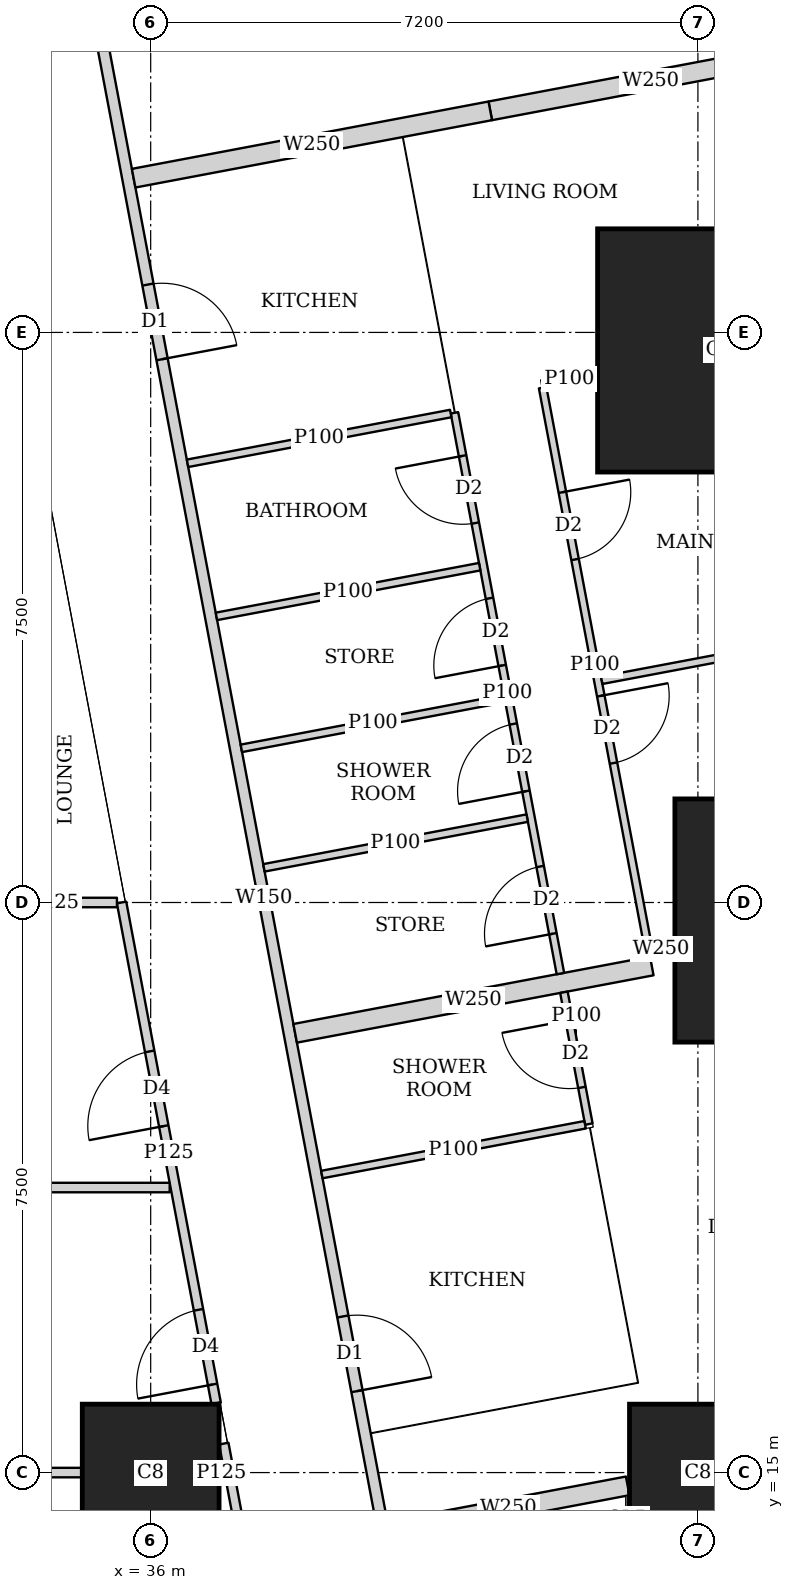
"""IFC4 building model, lengths in metres.
Left out: names, types, materials, properties, quantities, classifications, styles, units other than length and angle.
Written with IfcOpenShell. Run it as: python <this file> out.ifc"""

import sys

from ifc_helpers import new_model, si_unit, direction, frame, frame_2d, origin, origin_2d, place, context, subcontext, project, spatial, rectangle, extrude, element, fill, save


model = new_model("IFC4")
c1 = context("Model", 3, precision=1e-05, world=origin(), true_north=direction((0.0, 1.0)))
c2 = subcontext(c1, "Body", "Model", "MODEL_VIEW")
j1 = project(units=[si_unit("LENGTHUNIT", "METRE"), si_unit("PLANEANGLEUNIT", "RADIAN")], contexts=[c1])
p1 = place(None, origin())
s1 = spatial("IfcSite", under=j1, at=p1, CompositionType="ELEMENT")
p2 = place(p1, origin())
s2 = spatial("IfcBuilding", under=s1, at=p2, CompositionType="ELEMENT")
p3 = place(p2, frame((0.0, 0.0, 23.75)))
s3 = spatial("IfcBuildingStorey", under=s2, at=p3, CompositionType="ELEMENT", Elevation=23.75)
for number, where, z_axis, x_axis in (
    (1, (36.0, 15.0, 0.0), (0.0, 0.0, 1.0), (1.0, 0.0, 0.0)),
    (2, (43.2, 15.0, 0.0), (0.0, 0.0, 1.0), (1.0, 0.0, 0.0)),
):
    element("IfcColumn", number, at=place(p3, frame(where, z_axis=z_axis, x_axis=x_axis)), inside=s3, PredefinedType="COLUMN", context=c2, shape_type="SweptSolid", body=[
        extrude(rectangle(XDim=1.8, YDim=1.8, at=origin_2d()), origin(), (0.0, 0.0, 1.0), 3.75),
    ])
p4 = place(p3, frame((44.697, 22.263, 0.0), z_axis=(0.0, 0.0, 1.0), x_axis=(1.0, 0.0, 0.0)))
e3 = element("IfcColumn", 3, at=p4, inside=s3, PredefinedType="COLUMN", context=c2, shape_type="SweptSolid", body=[
    extrude(rectangle(XDim=3.6, YDim=3.2, at=origin_2d()), origin(), (0.0, 0.0, 1.0), 3.75),
])
p5 = place(p3, frame((43.48, 29.763, 0.0), z_axis=(0.0, 0.0, 1.0), x_axis=(1.0, 0.0, 0.0)))
e4 = element("IfcColumn", 4, at=p5, inside=s3, PredefinedType="COLUMN", context=c2, shape_type="SweptSolid", body=[
    extrude(rectangle(XDim=3.2, YDim=3.2, at=origin_2d()), origin(), (0.0, 0.0, 1.0), 3.75),
])
p6 = place(p3, frame((50.653, 2.703, 0.0), z_axis=(0.0, 0.0, 1.0), x_axis=(-0.185612026696, 0.982623109613, 0.0)))
e5 = element("IfcWall", 5, at=p6, inside=s3, PredefinedType="SOLIDWALL", context=c2, shape_type="SweptSolid", body=[
    extrude(rectangle(XDim=41.393, YDim=0.2, at=frame_2d((20.697, 0.0))), origin(), (0.0, 0.0, 1.0), 3.5),
])
p7 = place(p6, frame((1.633, 0.0, 0.9)))
e6 = element("IfcOpeningElement", 6, at=p7, cuts=e5, PredefinedType="OPENING", context=c2, shape_type="SweptSolid", body=[
    extrude(rectangle(XDim=1.8, YDim=1.5, at=frame_2d((0.9, 0.75))), frame((0.0, 0.11, 0.0), z_axis=(0.0, -1.0, 0.0), x_axis=(1.0, 0.0, 0.0)), (0.0, 0.0, 1.0), 0.22),
])
p8 = place(p6, frame((6.032, 0.0, 0.9)))
e7 = element("IfcOpeningElement", 7, at=p8, cuts=e5, PredefinedType="OPENING", context=c2, shape_type="SweptSolid", body=[
    extrude(rectangle(XDim=1.8, YDim=1.5, at=frame_2d((0.9, 0.75))), frame((0.0, 0.11, 0.0), z_axis=(0.0, -1.0, 0.0), x_axis=(1.0, 0.0, 0.0)), (0.0, 0.0, 1.0), 0.22),
])
p9 = place(p6, frame((9.848, 0.0, 0.9)))
e8 = element("IfcOpeningElement", 8, at=p9, cuts=e5, PredefinedType="OPENING", context=c2, shape_type="SweptSolid", body=[
    extrude(rectangle(XDim=1.8, YDim=1.5, at=frame_2d((0.9, 0.75))), frame((0.0, 0.11, 0.0), z_axis=(0.0, -1.0, 0.0), x_axis=(1.0, 0.0, 0.0)), (0.0, 0.0, 1.0), 0.22),
])
p10 = place(p6, frame((17.481, 0.0, 0.9)))
e9 = element("IfcOpeningElement", 9, at=p10, cuts=e5, PredefinedType="OPENING", context=c2, shape_type="SweptSolid", body=[
    extrude(rectangle(XDim=1.8, YDim=1.5, at=frame_2d((0.9, 0.75))), frame((0.0, 0.11, 0.0), z_axis=(0.0, -1.0, 0.0), x_axis=(1.0, 0.0, 0.0)), (0.0, 0.0, 1.0), 0.22),
])
p11 = place(p6, frame((21.297, 0.0, 0.9)))
e10 = element("IfcOpeningElement", 10, at=p11, cuts=e5, PredefinedType="OPENING", context=c2, shape_type="SweptSolid", body=[
    extrude(rectangle(XDim=1.8, YDim=1.5, at=frame_2d((0.9, 0.75))), frame((0.0, 0.11, 0.0), z_axis=(0.0, -1.0, 0.0), x_axis=(1.0, 0.0, 0.0)), (0.0, 0.0, 1.0), 0.22),
])
p12 = place(p6, frame((25.113, 0.0, 0.9)))
e11 = element("IfcOpeningElement", 11, at=p12, cuts=e5, PredefinedType="OPENING", context=c2, shape_type="SweptSolid", body=[
    extrude(rectangle(XDim=1.8, YDim=1.5, at=frame_2d((0.9, 0.75))), frame((0.0, 0.11, 0.0), z_axis=(0.0, -1.0, 0.0), x_axis=(1.0, 0.0, 0.0)), (0.0, 0.0, 1.0), 0.22),
])
p13 = place(p6, frame((28.93, 0.0, 0.9)))
e12 = element("IfcOpeningElement", 12, at=p13, cuts=e5, PredefinedType="OPENING", context=c2, shape_type="SweptSolid", body=[
    extrude(rectangle(XDim=1.8, YDim=1.5, at=frame_2d((0.9, 0.75))), frame((0.0, 0.11, 0.0), z_axis=(0.0, -1.0, 0.0), x_axis=(1.0, 0.0, 0.0)), (0.0, 0.0, 1.0), 0.22),
])
p14 = place(p6, frame((32.746, 0.0, 0.9)))
e13 = element("IfcOpeningElement", 13, at=p14, cuts=e5, PredefinedType="OPENING", context=c2, shape_type="SweptSolid", body=[
    extrude(rectangle(XDim=1.8, YDim=1.5, at=frame_2d((0.9, 0.75))), frame((0.0, 0.11, 0.0), z_axis=(0.0, -1.0, 0.0), x_axis=(1.0, 0.0, 0.0)), (0.0, 0.0, 1.0), 0.22),
])
p15 = place(p6, frame((36.481, 0.0, 0.9)))
e14 = element("IfcOpeningElement", 14, at=p15, cuts=e5, PredefinedType="OPENING", context=c2, shape_type="SweptSolid", body=[
    extrude(rectangle(XDim=1.8, YDim=1.5, at=frame_2d((0.9, 0.75))), frame((0.0, 0.11, 0.0), z_axis=(0.0, -1.0, 0.0), x_axis=(1.0, 0.0, 0.0)), (0.0, 0.0, 1.0), 0.22),
])
p16 = place(p3, frame((33.755, 42.325, 0.0), z_axis=(0.0, 0.0, 1.0), x_axis=(0.185611461091, -0.982623216453, 0.0)))
e15 = element("IfcWall", 15, at=p16, inside=s3, PredefinedType="SOLIDWALL", context=c2, shape_type="SweptSolid", body=[
    extrude(rectangle(XDim=40.241, YDim=0.15, at=frame_2d((20.121, 0.0))), origin(), (0.0, 0.0, 1.0), 2.5),
])
p17 = place(p16, frame((7.325, 0.0, 0.0)))
e16 = element("IfcOpeningElement", 16, at=p17, cuts=e15, PredefinedType="OPENING", context=c2, shape_type="SweptSolid", body=[
    extrude(rectangle(XDim=1.0, YDim=2.1, at=frame_2d((0.5, 1.05))), frame((0.0, 0.085, 0.0), z_axis=(0.0, -1.0, 0.0), x_axis=(1.0, 0.0, 0.0)), (0.0, 0.0, 1.0), 0.17),
])
p18 = place(p16, frame((11.902, 0.0, 0.0)))
e17 = element("IfcOpeningElement", 17, at=p18, cuts=e15, PredefinedType="OPENING", context=c2, shape_type="SweptSolid", body=[
    extrude(rectangle(XDim=1.0, YDim=2.1, at=frame_2d((0.5, 1.05))), frame((0.0, 0.085, 0.0), z_axis=(0.0, -1.0, 0.0), x_axis=(1.0, 0.0, 0.0)), (0.0, 0.0, 1.0), 0.17),
])
p19 = place(p16, frame((25.718, 0.0, 0.0)))
e18 = element("IfcOpeningElement", 18, at=p19, cuts=e15, PredefinedType="OPENING", context=c2, shape_type="SweptSolid", body=[
    extrude(rectangle(XDim=1.0, YDim=2.1, at=frame_2d((0.5, 1.05))), frame((0.0, 0.085, 0.0), z_axis=(0.0, -1.0, 0.0), x_axis=(1.0, 0.0, 0.0)), (0.0, 0.0, 1.0), 0.17),
])
p20 = place(p16, frame((31.788, 0.0, 0.0)))
e19 = element("IfcOpeningElement", 19, at=p20, cuts=e15, PredefinedType="OPENING", context=c2, shape_type="SweptSolid", body=[
    extrude(rectangle(XDim=1.0, YDim=2.1, at=frame_2d((0.5, 1.05))), frame((0.0, 0.085, 0.0), z_axis=(0.0, -1.0, 0.0), x_axis=(1.0, 0.0, 0.0)), (0.0, 0.0, 1.0), 0.17),
])
p21 = place(p3, frame((41.157, 29.273, 0.0), z_axis=(0.0, 0.0, 1.0), x_axis=(0.18542464283, -0.982658486877, 0.0)))
e20 = element("IfcWall", 20, at=p21, inside=s3, PredefinedType="PARTITIONING", context=c2, shape_type="SweptSolid", body=[
    extrude(rectangle(XDim=7.421, YDim=0.1, at=frame_2d((3.71, 0.0))), origin(), (0.0, 0.0, 1.0), 2.5),
])
p22 = place(p21, frame((1.4, 0.0, 0.0)))
e21 = element("IfcOpeningElement", 21, at=p22, cuts=e20, PredefinedType="OPENING", context=c2, shape_type="SweptSolid", body=[
    extrude(rectangle(XDim=0.9, YDim=2.1, at=frame_2d((0.45, 1.05))), frame((0.0, 0.06, 0.0), z_axis=(0.0, -1.0, 0.0), x_axis=(1.0, 0.0, 0.0)), (0.0, 0.0, 1.0), 0.12),
])
p23 = place(p21, frame((4.126, 0.0, 0.0)))
e22 = element("IfcOpeningElement", 22, at=p23, cuts=e20, PredefinedType="OPENING", context=c2, shape_type="SweptSolid", body=[
    extrude(rectangle(XDim=0.9, YDim=2.1, at=frame_2d((0.45, 1.05))), frame((0.0, 0.06, 0.0), z_axis=(0.0, -1.0, 0.0), x_axis=(1.0, 0.0, 0.0)), (0.0, 0.0, 1.0), 0.12),
])
p24 = place(p3, frame((39.997, 28.942, 0.0), z_axis=(0.0, 0.0, 1.0), x_axis=(0.185686318797, -0.982609073341, 0.0)))
e23 = element("IfcWall", 23, at=p24, inside=s3, PredefinedType="PARTITIONING", context=c2, shape_type="SweptSolid", body=[
    extrude(rectangle(XDim=7.508, YDim=0.1, at=frame_2d((3.754, 0.0))), origin(), (0.0, 0.0, 1.0), 2.5),
])
p25 = place(p24, frame((0.576, 0.0, 0.0)))
e24 = element("IfcOpeningElement", 24, at=p25, cuts=e23, PredefinedType="OPENING", context=c2, shape_type="SweptSolid", body=[
    extrude(rectangle(XDim=0.9, YDim=2.1, at=frame_2d((0.45, 1.05))), frame((0.0, 0.06, 0.0), z_axis=(0.0, -1.0, 0.0), x_axis=(1.0, 0.0, 0.0)), (0.0, 0.0, 1.0), 0.12),
])
p26 = place(p24, frame((4.166, 0.0, 0.0)))
e25 = element("IfcOpeningElement", 25, at=p26, cuts=e23, PredefinedType="OPENING", context=c2, shape_type="SweptSolid", body=[
    extrude(rectangle(XDim=0.9, YDim=2.1, at=frame_2d((0.45, 1.05))), frame((0.0, 0.06, 0.0), z_axis=(0.0, -1.0, 0.0), x_axis=(1.0, 0.0, 0.0)), (0.0, 0.0, 1.0), 0.12),
])
p27 = place(p24, frame((2.483, 0.0, 0.0)))
e26 = element("IfcOpeningElement", 26, at=p27, cuts=e23, PredefinedType="OPENING", context=c2, shape_type="SweptSolid", body=[
    extrude(rectangle(XDim=0.9, YDim=2.1, at=frame_2d((0.45, 1.05))), frame((0.0, 0.06, 0.0), z_axis=(0.0, -1.0, 0.0), x_axis=(1.0, 0.0, 0.0)), (0.0, 0.0, 1.0), 0.12),
])
p28 = place(p24, frame((6.074, 0.0, 0.0)))
e27 = element("IfcOpeningElement", 27, at=p28, cuts=e23, PredefinedType="OPENING", context=c2, shape_type="SweptSolid", body=[
    extrude(rectangle(XDim=0.9, YDim=2.1, at=frame_2d((0.45, 1.05))), frame((0.0, 0.06, 0.0), z_axis=(0.0, -1.0, 0.0), x_axis=(1.0, 0.0, 0.0)), (0.0, 0.0, 1.0), 0.12),
])
p29 = place(p3, frame((41.87, 29.459, 0.0), z_axis=(0.0, 0.0, 1.0), x_axis=(-0.982532562822, -0.186090738603, 0.0)))
e28 = element("IfcWall", 28, at=p29, inside=s3, PredefinedType="PARTITIONING", context=c2, shape_type="SweptSolid", body=[
    extrude(rectangle(XDim=0.736, YDim=0.1, at=frame_2d((0.368, 0.0))), origin(), (0.0, 0.0, 1.0), 2.5),
])
p30 = place(p3, frame((46.11, 26.213, 0.0), z_axis=(0.0, 0.0, 1.0), x_axis=(-0.982623519589, -0.185609856287, 0.0)))
e29 = element("IfcWall", 29, at=p30, inside=s3, PredefinedType="PARTITIONING", context=c2, shape_type="SweptSolid", body=[
    extrude(rectangle(XDim=4.25, YDim=0.1, at=frame_2d((2.125, 0.0))), origin(), (0.0, 0.0, 1.0), 2.05),
])
for number, where, z_axis, x_axis in (
    (30, (39.948, 28.933, 0.0), (0.0, 0.0, 1.0), (-0.983, -0.186, 0.0)),
    (31, (40.656, 25.183, 0.0), (0.0, 0.0, 1.0), (-0.983, -0.186, 0.0)),
):
    element("IfcWall", number, at=place(p3, frame(where, z_axis=z_axis, x_axis=x_axis)), inside=s3, PredefinedType="PARTITIONING", context=c2, shape_type="SweptSolid", body=[
        extrude(rectangle(XDim=3.524, YDim=0.1, at=frame_2d((1.762, 0.0))), origin(), (0.0, 0.0, 1.0), 3.5),
    ])
p31 = place(p3, frame((40.329, 26.918, 0.0), z_axis=(0.0, 0.0, 1.0), x_axis=(-0.982638553676, -0.185530247748, 0.0)))
e32 = element("IfcWall", 32, at=p31, inside=s3, PredefinedType="PARTITIONING", context=c2, shape_type="SweptSolid", body=[
    extrude(rectangle(XDim=3.525, YDim=0.1, at=frame_2d((1.763, 0.0))), origin(), (0.0, 0.0, 1.0), 3.5),
])
p32 = place(p3, frame((40.954, 23.61, 0.0), z_axis=(0.0, 0.0, 1.0), x_axis=(-0.982638553676, -0.185530247748, 0.0)))
e33 = element("IfcWall", 33, at=p32, inside=s3, PredefinedType="PARTITIONING", context=c2, shape_type="SweptSolid", body=[
    extrude(rectangle(XDim=3.525, YDim=0.1, at=frame_2d((1.763, 0.0))), origin(), (0.0, 0.0, 1.0), 2.5),
])
p33 = place(p3, frame((44.693, 33.713, 0.0), z_axis=(0.0, 0.0, 1.0), x_axis=(-0.982633535512, -0.185556823879, 0.0)))
e34 = element("IfcWall", 34, at=p33, inside=s3, PredefinedType="SOLIDWALL", context=c2, shape_type="SweptSolid", body=[
    extrude(rectangle(XDim=4.3, YDim=0.25, at=frame_2d((2.15, 0.0))), origin(), (0.0, 0.0, 1.0), 2.05),
])
p34 = place(p3, frame((40.468, 32.915, 0.0), z_axis=(0.0, 0.0, 1.0), x_axis=(-0.982635807605, -0.185544791394, 0.0)))
e35 = element("IfcWall", 35, at=p34, inside=s3, PredefinedType="SOLIDWALL", context=c2, shape_type="SweptSolid", body=[
    extrude(rectangle(XDim=4.775, YDim=0.25, at=frame_2d((2.388, 0.0))), origin(), (0.0, 0.0, 1.0), 3.5),
])
p35 = place(p3, frame((41.437, 21.319, 0.0), z_axis=(0.0, 0.0, 1.0), x_axis=(0.185783379659, -0.98259072652, 0.0)))
e36 = element("IfcWall", 36, at=p35, inside=s3, PredefinedType="PARTITIONING", context=c2, shape_type="SweptSolid", body=[
    extrude(rectangle(XDim=1.765, YDim=0.1, at=frame_2d((0.882, 0.0))), origin(), (0.0, 0.0, 1.0), 3.5),
])
p36 = place(p35, frame((0.374, 0.0, 0.0)))
e37 = element("IfcOpeningElement", 37, at=p36, cuts=e36, PredefinedType="OPENING", context=c2, shape_type="SweptSolid", body=[
    extrude(rectangle(XDim=0.9, YDim=2.1, at=frame_2d((0.45, 1.05))), frame((0.0, 0.06, 0.0), z_axis=(0.0, -1.0, 0.0), x_axis=(1.0, 0.0, 0.0)), (0.0, 0.0, 1.0), 0.12),
])
p37 = place(p3, frame((41.716, 19.576, 0.0), z_axis=(0.0, 0.0, 1.0), x_axis=(-0.982588017646, -0.185797706064, 0.0)))
e38 = element("IfcWall", 38, at=p37, inside=s3, PredefinedType="PARTITIONING", context=c2, shape_type="SweptSolid", body=[
    extrude(rectangle(XDim=3.525, YDim=0.1, at=frame_2d((1.763, 0.0))), origin(), (0.0, 0.0, 1.0), 3.5),
])
p38 = place(p3, frame((42.873, 21.918, 0.0), z_axis=(0.0, 0.0, 1.0), x_axis=(-0.982431406936, -0.186624035603, 0.0)))
e39 = element("IfcWall", 39, at=p38, inside=s3, PredefinedType="SOLIDWALL", context=c2, shape_type="SweptSolid", body=[
    extrude(rectangle(XDim=0.322, YDim=0.25, at=frame_2d((0.161, 0.0))), origin(), (0.0, 0.0, 1.0), 2.5),
])
p39 = place(p3, frame((42.593, 21.665, 0.0), z_axis=(0.0, 0.0, 1.0), x_axis=(-0.982635807605, -0.185544791394, 0.0)))
e40 = element("IfcWall", 40, at=p39, inside=s3, PredefinedType="SOLIDWALL", context=c2, shape_type="SweptSolid", body=[
    extrude(rectangle(XDim=4.775, YDim=0.25, at=frame_2d((2.388, 0.0))), origin(), (0.0, 0.0, 1.0), 2.5),
])
p40 = place(p3, frame((42.276, 14.825, 0.0), z_axis=(0.0, 0.0, 1.0), x_axis=(-0.982607211054, -0.185696173318, 0.0)))
e41 = element("IfcWall", 41, at=p40, inside=s3, PredefinedType="SOLIDWALL", context=c2, shape_type="SweptSolid", body=[
    extrude(rectangle(XDim=3.194, YDim=0.25, at=frame_2d((1.597, 0.0))), origin(), (0.0, 0.0, 1.0), 3.5),
])
p41 = place(p3, frame((37.9, 10.413, 0.0), z_axis=(0.0, 0.0, 1.0), x_axis=(-0.185527510388, 0.982639070508, 0.0)))
e42 = element("IfcWall", 42, at=p41, inside=s3, PredefinedType="PARTITIONING", context=c2, shape_type="SweptSolid", body=[
    extrude(rectangle(XDim=5.056, YDim=0.125, at=frame_2d((2.528, 0.0))), origin(), (0.0, 0.0, 1.0), 3.5),
])
p42 = place(p41, frame((0.708, 0.0, 0.0)))
e43 = element("IfcOpeningElement", 43, at=p42, cuts=e42, PredefinedType="OPENING", context=c2, shape_type="SweptSolid", body=[
    extrude(rectangle(XDim=1.0, YDim=2.1, at=frame_2d((0.5, 1.05))), frame((0.0, 0.073, 0.0), z_axis=(0.0, -1.0, 0.0), x_axis=(1.0, 0.0, 0.0)), (0.0, 0.0, 1.0), 0.145),
])
p43 = place(p3, frame((36.861, 15.913, 0.0), z_axis=(0.0, 0.0, 1.0), x_axis=(-0.185598960122, 0.982625577726, 0.0)))
e44 = element("IfcWall", 44, at=p43, inside=s3, PredefinedType="PARTITIONING", context=c2, shape_type="SweptSolid", body=[
    extrude(rectangle(XDim=6.703, YDim=0.125, at=frame_2d((3.352, 0.0))), origin(), (0.0, 0.0, 1.0), 2.5),
])
p44 = place(p43, frame((0.25, 0.0, 0.0)))
e45 = element("IfcOpeningElement", 45, at=p44, cuts=e44, PredefinedType="OPENING", context=c2, shape_type="SweptSolid", body=[
    extrude(rectangle(XDim=1.0, YDim=2.1, at=frame_2d((0.5, 1.05))), frame((0.0, 0.073, 0.0), z_axis=(0.0, -1.0, 0.0), x_axis=(1.0, 0.0, 0.0)), (0.0, 0.0, 1.0), 0.145),
])
p45 = place(p43, frame((3.71, 0.0, 0.0)))
e46 = element("IfcOpeningElement", 46, at=p45, cuts=e44, PredefinedType="OPENING", context=c2, shape_type="SweptSolid", body=[
    extrude(rectangle(XDim=1.0, YDim=2.1, at=frame_2d((0.5, 1.05))), frame((0.0, 0.073, 0.0), z_axis=(0.0, -1.0, 0.0), x_axis=(1.0, 0.0, 0.0)), (0.0, 0.0, 1.0), 0.145),
])
p46 = place(p3, frame((29.25, 15.0, 0.0), z_axis=(0.0, 0.0, 1.0), x_axis=(1.0, 0.0, 0.0)))
e47 = element("IfcWall", 47, at=p46, inside=s3, PredefinedType="PARTITIONING", context=c2, shape_type="SweptSolid", body=[
    extrude(rectangle(XDim=5.849, YDim=0.125, at=frame_2d((2.925, 0.0))), origin(), (0.0, 0.0, 1.0), 3.5),
])
p47 = place(p3, frame((36.901, 15.0, 0.0), z_axis=(0.0, 0.0, 1.0), x_axis=(1.0, 0.0, 0.0)))
e48 = element("IfcWall", 48, at=p47, inside=s3, PredefinedType="PARTITIONING", context=c2, shape_type="SweptSolid", body=[
    extrude(rectangle(XDim=0.057, YDim=0.125, at=frame_2d((0.029, 0.0))), origin(), (0.0, 0.0, 1.0), 3.5),
])
p48 = place(p3, frame((29.25, 18.75, 0.0), z_axis=(0.0, 0.0, 1.0), x_axis=(1.0, 0.0, 0.0)))
e49 = element("IfcWall", 49, at=p48, inside=s3, PredefinedType="PARTITIONING", context=c2, shape_type="SweptSolid", body=[
    extrude(rectangle(XDim=7.0, YDim=0.125, at=frame_2d((3.5, 0.0))), origin(), (0.0, 0.0, 1.0), 3.5),
])
p49 = place(p3, frame((33.901, 22.5, 0.0), z_axis=(0.0, 0.0, 1.0), x_axis=(1.0, 0.0, 0.0)))
e50 = element("IfcWall", 50, at=p49, inside=s3, PredefinedType="PARTITIONING", context=c2, shape_type="SweptSolid", body=[
    extrude(rectangle(XDim=1.655, YDim=0.125, at=frame_2d((0.828, 0.0))), origin(), (0.0, 0.0, 1.0), 2.5),
])
p50 = place(p22, origin())
e51 = element("IfcDoor", 51, at=p50, inside=s3, OperationType="SINGLE_SWING_LEFT", PredefinedType="DOOR", context=c2, shape_type="SweptSolid", body=[
    extrude(rectangle(XDim=0.9, YDim=2.1, at=frame_2d((0.45, 1.05))), frame((0.0, 0.025, 0.0), z_axis=(0.0, -1.0, 0.0), x_axis=(1.0, 0.0, 0.0)), (0.0, 0.0, 1.0), 0.05),
])
fill(e21, e51)
p51 = place(p23, origin())
e52 = element("IfcDoor", 52, at=p51, inside=s3, OperationType="SINGLE_SWING_LEFT", PredefinedType="DOOR", context=c2, shape_type="SweptSolid", body=[
    extrude(rectangle(XDim=0.9, YDim=2.1, at=frame_2d((0.45, 1.05))), frame((0.0, 0.025, 0.0), z_axis=(0.0, -1.0, 0.0), x_axis=(1.0, 0.0, 0.0)), (0.0, 0.0, 1.0), 0.05),
])
fill(e22, e52)
p52 = place(p25, origin())
e53 = element("IfcDoor", 53, at=p52, inside=s3, OperationType="SINGLE_SWING_RIGHT", PredefinedType="DOOR", context=c2, shape_type="SweptSolid", body=[
    extrude(rectangle(XDim=0.9, YDim=2.1, at=frame_2d((0.45, 1.05))), frame((0.0, 0.025, 0.0), z_axis=(0.0, -1.0, 0.0), x_axis=(1.0, 0.0, 0.0)), (0.0, 0.0, 1.0), 0.05),
])
fill(e24, e53)
p53 = place(p26, origin())
e54 = element("IfcDoor", 54, at=p53, inside=s3, OperationType="SINGLE_SWING_LEFT", PredefinedType="DOOR", context=c2, shape_type="SweptSolid", body=[
    extrude(rectangle(XDim=0.9, YDim=2.1, at=frame_2d((0.45, 1.05))), frame((0.0, 0.025, 0.0), z_axis=(0.0, -1.0, 0.0), x_axis=(1.0, 0.0, 0.0)), (0.0, 0.0, 1.0), 0.05),
])
fill(e25, e54)
p54 = place(p27, origin())
e55 = element("IfcDoor", 55, at=p54, inside=s3, OperationType="SINGLE_SWING_LEFT", PredefinedType="DOOR", context=c2, shape_type="SweptSolid", body=[
    extrude(rectangle(XDim=0.9, YDim=2.1, at=frame_2d((0.45, 1.05))), frame((0.0, 0.025, 0.0), z_axis=(0.0, -1.0, 0.0), x_axis=(1.0, 0.0, 0.0)), (0.0, 0.0, 1.0), 0.05),
])
fill(e26, e55)
p55 = place(p28, origin())
e56 = element("IfcDoor", 56, at=p55, inside=s3, OperationType="SINGLE_SWING_LEFT", PredefinedType="DOOR", context=c2, shape_type="SweptSolid", body=[
    extrude(rectangle(XDim=0.9, YDim=2.1, at=frame_2d((0.45, 1.05))), frame((0.0, 0.025, 0.0), z_axis=(0.0, -1.0, 0.0), x_axis=(1.0, 0.0, 0.0)), (0.0, 0.0, 1.0), 0.05),
])
fill(e27, e56)
p56 = place(p18, origin())
e57 = element("IfcDoor", 57, at=p56, inside=s3, OperationType="SINGLE_SWING_RIGHT", PredefinedType="DOOR", context=c2, shape_type="SweptSolid", body=[
    extrude(rectangle(XDim=1.0, YDim=2.1, at=frame_2d((0.5, 1.05))), frame((0.0, 0.025, 0.0), z_axis=(0.0, -1.0, 0.0), x_axis=(1.0, 0.0, 0.0)), (0.0, 0.0, 1.0), 0.05),
])
fill(e17, e57)
p57 = place(p36, origin())
e58 = element("IfcDoor", 58, at=p57, inside=s3, OperationType="SINGLE_SWING_RIGHT", PredefinedType="DOOR", context=c2, shape_type="SweptSolid", body=[
    extrude(rectangle(XDim=0.9, YDim=2.1, at=frame_2d((0.45, 1.05))), frame((0.0, 0.025, 0.0), z_axis=(0.0, -1.0, 0.0), x_axis=(1.0, 0.0, 0.0)), (0.0, 0.0, 1.0), 0.05),
])
fill(e37, e58)
p58 = place(p19, origin())
e59 = element("IfcDoor", 59, at=p58, inside=s3, OperationType="SINGLE_SWING_RIGHT", PredefinedType="DOOR", context=c2, shape_type="SweptSolid", body=[
    extrude(rectangle(XDim=1.0, YDim=2.1, at=frame_2d((0.5, 1.05))), frame((0.0, 0.025, 0.0), z_axis=(0.0, -1.0, 0.0), x_axis=(1.0, 0.0, 0.0)), (0.0, 0.0, 1.0), 0.05),
])
fill(e18, e59)
p59 = place(p44, origin())
e60 = element("IfcDoor", 60, at=p59, inside=s3, OperationType="SINGLE_SWING_LEFT", PredefinedType="DOOR", context=c2, shape_type="SweptSolid", body=[
    extrude(rectangle(XDim=1.0, YDim=2.1, at=frame_2d((0.5, 1.05))), frame((0.0, 0.025, 0.0), z_axis=(0.0, -1.0, 0.0), x_axis=(1.0, 0.0, 0.0)), (0.0, 0.0, 1.0), 0.05),
])
fill(e45, e60)
p60 = place(p45, origin())
e61 = element("IfcDoor", 61, at=p60, inside=s3, OperationType="SINGLE_SWING_LEFT", PredefinedType="DOOR", context=c2, shape_type="SweptSolid", body=[
    extrude(rectangle(XDim=1.0, YDim=2.1, at=frame_2d((0.5, 1.05))), frame((0.0, 0.025, 0.0), z_axis=(0.0, -1.0, 0.0), x_axis=(1.0, 0.0, 0.0)), (0.0, 0.0, 1.0), 0.05),
])
fill(e46, e61)
save(model, sys.argv[1])
